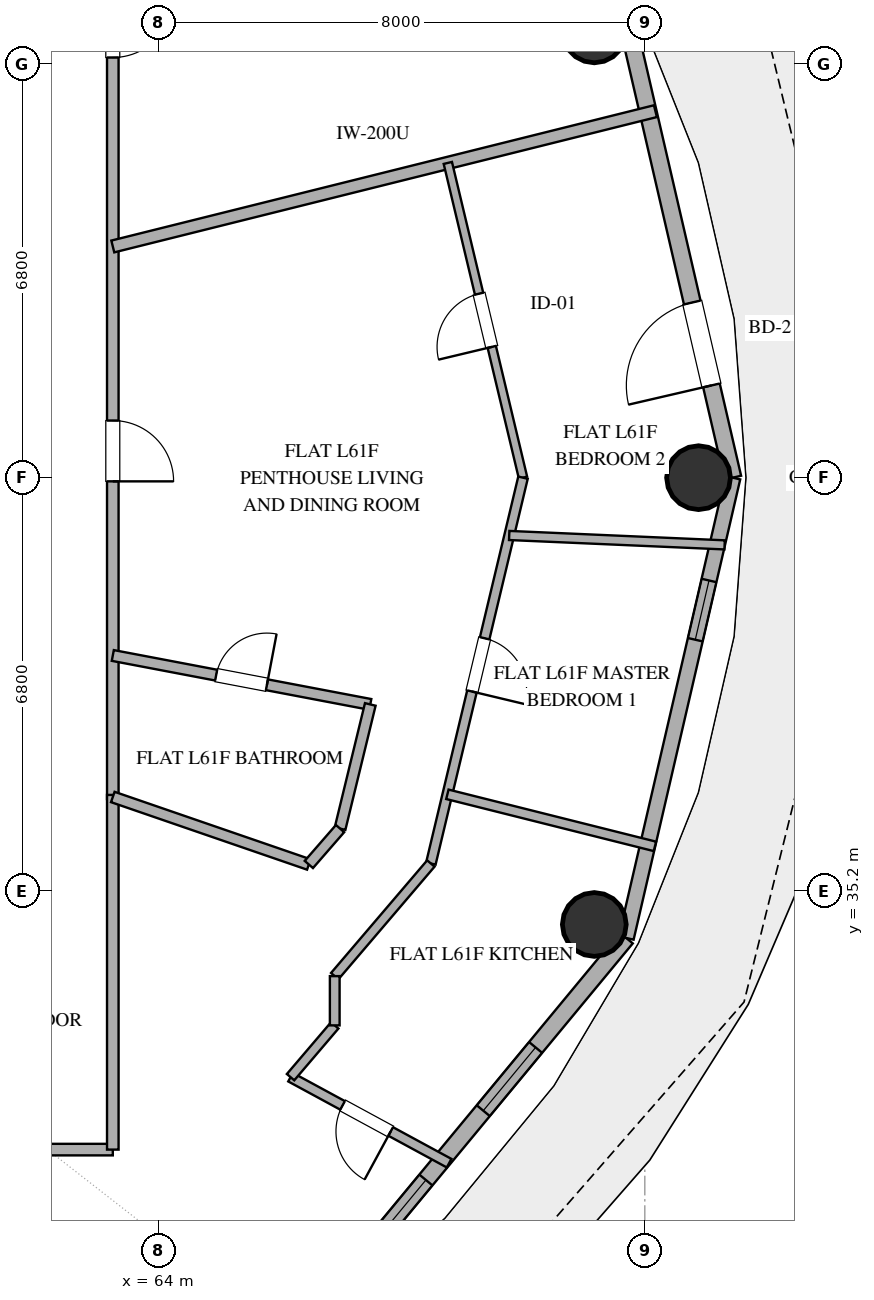
"""IFC4 building model, lengths in metres.
Left out: names, types, materials, properties, quantities, classifications, styles, units other than length and angle.
Written with IfcOpenShell. Run it as: python <this file> out.ifc"""

import sys

from ifc_helpers import new_model, si_unit, direction, frame, frame_2d, origin, origin_2d, place, context, subcontext, project, spatial, rectangle, hollow_circle, extrude, element, fill, save


model = new_model("IFC4")
c1 = context("Model", 3, precision=1e-05, world=origin(), true_north=direction((0.0, 1.0)))
c2 = subcontext(c1, "Body", "Model", "MODEL_VIEW")
j1 = project(units=[si_unit("LENGTHUNIT", "METRE"), si_unit("PLANEANGLEUNIT", "RADIAN")], contexts=[c1])
p1 = place(None, origin())
s1 = spatial("IfcSite", under=j1, at=p1, CompositionType="ELEMENT")
p2 = place(p1, origin())
s2 = spatial("IfcBuilding", under=s1, at=p2, CompositionType="ELEMENT")
p3 = place(p2, frame((0.0, 0.0, 238.8)))
s3 = spatial("IfcBuildingStorey", under=s2, at=p3, CompositionType="ELEMENT", Elevation=238.8)
for number, where, z_axis, x_axis in (
    (1, (72.883, 42.0, 0.0), (0.0, 0.0, 1.0), (1.0, 0.0, 0.0)),
    (2, (71.169, 49.347, 0.0), (0.0, 0.0, 1.0), (1.0, 0.0, 0.0)),
    (3, (71.169, 34.653, 0.0), (0.0, 0.0, 1.0), (1.0, 0.0, 0.0)),
):
    element("IfcColumn", number, at=place(p3, frame(where, z_axis=z_axis, x_axis=x_axis)), inside=s3, PredefinedType="COLUMN", context=c2, shape_type="SweptSolid", body=[
        extrude(hollow_circle(Radius=0.525, WallThickness=0.028, at=origin_2d()), origin(), (0.0, 0.0, 1.0), 3.36),
    ])
p4 = place(p3, frame((73.447, 42.0, 0.0), z_axis=(0.0, 0.0, 1.0), x_axis=(-0.225635078214, 0.974211892495, 0.0)))
e4 = element("IfcWall", 4, at=p4, inside=s3, PredefinedType="SOLIDWALL", context=c2, shape_type="SweptSolid", body=[
    extrude(rectangle(XDim=7.77, YDim=0.28, at=frame_2d((3.885, 0.0))), origin(), (0.0, 0.0, 1.0), 3.36),
])
p5 = place(p4, frame((1.557, 0.0, 0.0)))
e5 = element("IfcOpeningElement", 5, at=p5, cuts=e4, PredefinedType="OPENING", context=c2, shape_type="SweptSolid", body=[
    extrude(rectangle(XDim=1.4, YDim=2.2, at=frame_2d((0.7, 1.1))), frame((0.0, 0.15, 0.0), z_axis=(0.0, -1.0, 0.0), x_axis=(1.0, 0.0, 0.0)), (0.0, 0.0, 1.0), 0.3),
])
p6 = place(p3, frame((66.383, 28.013, 0.0), z_axis=(0.0, 0.0, 1.0), x_axis=(0.63761509934, 0.770355103243, 0.0)))
e6 = element("IfcWall", 6, at=p6, inside=s3, PredefinedType="SOLIDWALL", context=c2, shape_type="SweptSolid", body=[
    extrude(rectangle(XDim=8.33, YDim=0.28, at=frame_2d((4.165, 0.0))), origin(), (0.0, 0.0, 1.0), 3.36),
])
p7 = place(p6, frame((1.663, 0.0, 0.85)))
e7 = element("IfcOpeningElement", 7, at=p7, cuts=e6, PredefinedType="OPENING", context=c2, shape_type="SweptSolid", body=[
    extrude(rectangle(XDim=1.5, YDim=1.8, at=frame_2d((0.75, 0.9))), frame((0.0, 0.15, 0.0), z_axis=(0.0, -1.0, 0.0), x_axis=(1.0, 0.0, 0.0)), (0.0, 0.0, 1.0), 0.3),
])
p8 = place(p6, frame((4.643, 0.0, 0.85)))
e8 = element("IfcOpeningElement", 8, at=p8, cuts=e6, PredefinedType="OPENING", context=c2, shape_type="SweptSolid", body=[
    extrude(rectangle(XDim=1.35, YDim=1.8, at=frame_2d((0.675, 0.9))), frame((0.0, 0.15, 0.0), z_axis=(0.0, -1.0, 0.0), x_axis=(1.0, 0.0, 0.0)), (0.0, 0.0, 1.0), 0.3),
])
p9 = place(p3, frame((71.694, 34.43, 0.0), z_axis=(0.0, 0.0, 1.0), x_axis=(0.225635078214, 0.974211892495, 0.0)))
e9 = element("IfcWall", 9, at=p9, inside=s3, PredefinedType="SOLIDWALL", context=c2, shape_type="SweptSolid", body=[
    extrude(rectangle(XDim=7.77, YDim=0.25, at=frame_2d((3.885, 0.0))), origin(), (0.0, 0.0, 1.0), 3.36),
])
p10 = place(p9, frame((5.034, 0.0, 1.42)))
e10 = element("IfcOpeningElement", 10, at=p10, cuts=e9, PredefinedType="OPENING", context=c2, shape_type="SweptSolid", body=[
    extrude(rectangle(XDim=1.0, YDim=1.05, at=frame_2d((0.5, 0.525))), frame((0.0, 0.135, 0.0), z_axis=(0.0, -1.0, 0.0), x_axis=(1.0, 0.0, 0.0)), (0.0, 0.0, 1.0), 0.27),
])
p11 = place(p3, frame((63.25, 30.95, 0.0), z_axis=(0.0, 0.0, 1.0), x_axis=(-1.0, 0.0, 0.0)))
e11 = element("IfcWall", 11, at=p11, inside=s3, PredefinedType="PARTITIONING", context=c2, shape_type="SweptSolid", body=[
    extrude(rectangle(XDim=19.715, YDim=0.19, at=frame_2d((9.857, 0.0))), origin(), (0.0, 0.0, 1.0), 2.72),
])
p12 = place(p11, frame((11.632, 0.0, 0.0)))
e12 = element("IfcOpeningElement", 12, at=p12, cuts=e11, PredefinedType="OPENING", context=c2, shape_type="SweptSolid", body=[
    extrude(rectangle(XDim=1.0, YDim=2.2, at=frame_2d((0.5, 1.1))), frame((0.0, 0.105, 0.0), z_axis=(0.0, -1.0, 0.0), x_axis=(1.0, 0.0, 0.0)), (0.0, 0.0, 1.0), 0.21),
])
p13 = place(p3, frame((63.25, 53.05, 0.0), z_axis=(0.0, 0.0, 1.0), x_axis=(0.0, -1.0, 0.0)))
e13 = element("IfcWall", 13, at=p13, inside=s3, PredefinedType="PARTITIONING", context=c2, shape_type="SweptSolid", body=[
    extrude(rectangle(XDim=16.335, YDim=0.19, at=frame_2d((8.167, 0.0))), origin(), (0.0, 0.0, 1.0), 2.72),
])
p14 = place(p13, frame((3.14, 0.0, 0.0)))
e14 = element("IfcOpeningElement", 14, at=p14, cuts=e13, PredefinedType="OPENING", context=c2, shape_type="SweptSolid", body=[
    extrude(rectangle(XDim=1.0, YDim=2.2, at=frame_2d((0.5, 1.1))), frame((0.0, 0.105, 0.0), z_axis=(0.0, -1.0, 0.0), x_axis=(1.0, 0.0, 0.0)), (0.0, 0.0, 1.0), 0.21),
])
p15 = place(p13, frame((10.111, 0.0, 0.0)))
e15 = element("IfcOpeningElement", 15, at=p15, cuts=e13, PredefinedType="OPENING", context=c2, shape_type="SweptSolid", body=[
    extrude(rectangle(XDim=1.0, YDim=2.2, at=frame_2d((0.5, 1.1))), frame((0.0, 0.105, 0.0), z_axis=(0.0, -1.0, 0.0), x_axis=(1.0, 0.0, 0.0)), (0.0, 0.0, 1.0), 0.21),
])
p16 = place(p3, frame((63.25, 36.783, 0.0), z_axis=(0.0, 0.0, 1.0), x_axis=(0.0, -1.0, 0.0)))
e16 = element("IfcWall", 16, at=p16, inside=s3, PredefinedType="PARTITIONING", context=c2, shape_type="SweptSolid", body=[
    extrude(rectangle(XDim=5.833, YDim=0.19, at=frame_2d((2.917, 0.0))), origin(), (0.0, 0.0, 1.0), 2.72),
])
p17 = place(p3, frame((63.25, 45.802, 0.0), z_axis=(0.0, 0.0, 1.0), x_axis=(0.970293772743, 0.241929730659, 0.0)))
e17 = element("IfcWall", 17, at=p17, inside=s3, PredefinedType="PARTITIONING", context=c2, shape_type="SweptSolid", body=[
    extrude(rectangle(XDim=9.197, YDim=0.2, at=frame_2d((4.599, 0.0))), origin(), (0.0, 0.0, 1.0), 2.72),
])
p18 = place(p3, frame((69.996, 42.0, 0.0), z_axis=(0.0, 0.0, 1.0), x_axis=(-0.232321322639, 0.972639091877, 0.0)))
e18 = element("IfcWall", 18, at=p18, inside=s3, PredefinedType="PARTITIONING", context=c2, shape_type="SweptSolid", body=[
    extrude(rectangle(XDim=5.322, YDim=0.14, at=frame_2d((2.661, 0.0))), origin(), (0.0, 0.0, 1.0), 2.72),
])
p19 = place(p18, frame((2.211, 0.0, 0.0)))
e19 = element("IfcOpeningElement", 19, at=p19, cuts=e18, PredefinedType="OPENING", context=c2, shape_type="SweptSolid", body=[
    extrude(rectangle(XDim=0.9, YDim=2.1, at=frame_2d((0.45, 1.05))), frame((0.0, 0.08, 0.0), z_axis=(0.0, -1.0, 0.0), x_axis=(1.0, 0.0, 0.0)), (0.0, 0.0, 1.0), 0.16),
])
p20 = place(p3, frame((69.996, 42.0, 0.0), z_axis=(0.0, 0.0, 1.0), x_axis=(-0.232298462197, -0.972644551962, 0.0)))
e20 = element("IfcWall", 20, at=p20, inside=s3, PredefinedType="PLUMBINGWALL", context=c2, shape_type="SweptSolid", body=[
    extrude(rectangle(XDim=6.523, YDim=0.16, at=frame_2d((3.262, 0.0))), origin(), (0.0, 0.0, 1.0), 2.72),
])
p21 = place(p20, frame((2.715, 0.0, 0.0)))
e21 = element("IfcOpeningElement", 21, at=p21, cuts=e20, PredefinedType="OPENING", context=c2, shape_type="SweptSolid", body=[
    extrude(rectangle(XDim=0.9, YDim=2.1, at=frame_2d((0.45, 1.05))), frame((0.0, 0.09, 0.0), z_axis=(0.0, -1.0, 0.0), x_axis=(1.0, 0.0, 0.0)), (0.0, 0.0, 1.0), 0.18),
])
p22 = place(p3, frame((63.25, 39.076, 0.0), z_axis=(0.0, 0.0, 1.0), x_axis=(0.982398995864, -0.186794574134, 0.0)))
e22 = element("IfcWall", 22, at=p22, inside=s3, PredefinedType="PLUMBINGWALL", context=c2, shape_type="SweptSolid", body=[
    extrude(rectangle(XDim=4.311, YDim=0.18, at=frame_2d((2.155, 0.0))), origin(), (0.0, 0.0, 1.0), 2.72),
])
p23 = place(p22, frame((1.73, 0.0, 0.0)))
e23 = element("IfcOpeningElement", 23, at=p23, cuts=e22, PredefinedType="OPENING", context=c2, shape_type="SweptSolid", body=[
    extrude(rectangle(XDim=0.85, YDim=2.1, at=frame_2d((0.425, 1.05))), frame((0.0, 0.1, 0.0), z_axis=(0.0, -1.0, 0.0), x_axis=(1.0, 0.0, 0.0)), (0.0, 0.0, 1.0), 0.2),
])
p24 = place(p3, frame((73.312, 40.895, 0.0), z_axis=(0.0, 0.0, 1.0), x_axis=(-0.999049912793, 0.043580635022, 0.0)))
e24 = element("IfcWall", 24, at=p24, inside=s3, PredefinedType="PARTITIONING", context=c2, shape_type="SweptSolid", body=[
    extrude(rectangle(XDim=3.546, YDim=0.15, at=frame_2d((1.773, 0.0))), origin(), (0.0, 0.0, 1.0), 2.72),
])
p25 = place(p3, frame((72.166, 35.937, 0.0), z_axis=(0.0, 0.0, 1.0), x_axis=(-0.96994628441, 0.24331914302, 0.0)))
e25 = element("IfcWall", 25, at=p25, inside=s3, PredefinedType="PLUMBINGWALL", context=c2, shape_type="SweptSolid", body=[
    extrude(rectangle(XDim=3.519, YDim=0.16, at=frame_2d((1.759, 0.0))), origin(), (0.0, 0.0, 1.0), 2.72),
])
p26 = place(p3, frame((66.474, 35.639, 0.0), z_axis=(0.0, 0.0, 1.0), x_axis=(-0.945522773294, 0.325555963211, 0.0)))
e26 = element("IfcWall", 26, at=p26, inside=s3, PredefinedType="PLUMBINGWALL", context=c2, shape_type="SweptSolid", body=[
    extrude(rectangle(XDim=3.41, YDim=0.18, at=frame_2d((1.705, 0.0))), origin(), (0.0, 0.0, 1.0), 2.72),
])
p27 = place(p3, frame((68.781, 30.727, 0.0), z_axis=(0.0, 0.0, 1.0), x_axis=(-0.878981574643, 0.476855734408, 0.0)))
e27 = element("IfcWall", 27, at=p27, inside=s3, PredefinedType="PLUMBINGWALL", context=c2, shape_type="SweptSolid", body=[
    extrude(rectangle(XDim=2.966, YDim=0.16, at=frame_2d((1.483, 0.0))), origin(), (0.0, 0.0, 1.0), 2.72),
])
p28 = place(p27, frame((1.093, 0.0, 0.0)))
e28 = element("IfcOpeningElement", 28, at=p28, cuts=e27, PredefinedType="OPENING", context=c2, shape_type="SweptSolid", body=[
    extrude(rectangle(XDim=0.9, YDim=2.1, at=frame_2d((0.45, 1.05))), frame((0.0, 0.09, 0.0), z_axis=(0.0, -1.0, 0.0), x_axis=(1.0, 0.0, 0.0)), (0.0, 0.0, 1.0), 0.18),
])
p29 = place(p3, frame((66.9, 33.803, 0.0), z_axis=(0.0, 0.0, 1.0), x_axis=(0.649270866973, 0.760557257082, 0.0)))
e29 = element("IfcWall", 29, at=p29, inside=s3, PredefinedType="PLUMBINGWALL", context=c2, shape_type="SweptSolid", body=[
    extrude(rectangle(XDim=2.435, YDim=0.16, at=frame_2d((1.218, 0.0))), origin(), (0.0, 0.0, 1.0), 2.72),
])
p30 = place(p3, frame((67.485, 38.271, 0.0), z_axis=(0.0, 0.0, 1.0), x_axis=(-0.236517575433, -0.971627210668, 0.0)))
e30 = element("IfcWall", 30, at=p30, inside=s3, PredefinedType="PLUMBINGWALL", context=c2, shape_type="SweptSolid", body=[
    extrude(rectangle(XDim=2.102, YDim=0.18, at=frame_2d((1.051, 0.0))), origin(), (0.0, 0.0, 1.0), 2.72),
])
p31 = place(p3, frame((66.174, 32.141, 0.0), z_axis=(0.0, 0.0, 1.0), x_axis=(0.648939178463, 0.760840287219, 0.0)))
e31 = element("IfcWall", 31, at=p31, inside=s3, PredefinedType="PLUMBINGWALL", context=c2, shape_type="SweptSolid", body=[
    extrude(rectangle(XDim=1.119, YDim=0.16, at=frame_2d((0.56, 0.0))), origin(), (0.0, 0.0, 1.0), 2.72),
])
p32 = place(p3, frame((66.9, 32.993, 0.0), z_axis=(0.0, 0.0, 1.0), x_axis=(0.0, 1.0, 0.0)))
e32 = element("IfcWall", 32, at=p32, inside=s3, PredefinedType="PLUMBINGWALL", context=c2, shape_type="SweptSolid", body=[
    extrude(rectangle(XDim=0.81, YDim=0.16, at=frame_2d((0.405, 0.0))), origin(), (0.0, 0.0, 1.0), 2.72),
])
p33 = place(p3, frame((66.988, 36.229, 0.0), z_axis=(0.0, 0.0, 1.0), x_axis=(-0.656402785683, -0.754410619589, 0.0)))
e33 = element("IfcWall", 33, at=p33, inside=s3, PredefinedType="PLUMBINGWALL", context=c2, shape_type="SweptSolid", body=[
    extrude(rectangle(XDim=0.782, YDim=0.18, at=frame_2d((0.391, 0.0))), origin(), (0.0, 0.0, 1.0), 2.72),
])
p34 = place(p5, origin())
e34 = element("IfcDoor", 34, at=p34, inside=s3, OperationType="SINGLE_SWING_LEFT", PredefinedType="DOOR", context=c2, shape_type="SweptSolid", body=[
    extrude(rectangle(XDim=1.4, YDim=2.2, at=frame_2d((0.7, 1.1))), frame((0.0, 0.025, 0.0), z_axis=(0.0, -1.0, 0.0), x_axis=(1.0, 0.0, 0.0)), (0.0, 0.0, 1.0), 0.05),
])
fill(e5, e34)
p35 = place(p7, origin())
e35 = element("IfcWindow", 35, at=p35, inside=s3, PartitioningType="SINGLE_PANEL", PredefinedType="WINDOW", context=c2, shape_type="SweptSolid", body=[
    extrude(rectangle(XDim=1.5, YDim=1.8, at=frame_2d((0.75, 0.9))), frame((0.0, 0.03, 0.0), z_axis=(0.0, -1.0, 0.0), x_axis=(1.0, 0.0, 0.0)), (0.0, 0.0, 1.0), 0.06),
])
fill(e7, e35)
p36 = place(p8, origin())
e36 = element("IfcWindow", 36, at=p36, inside=s3, PartitioningType="SINGLE_PANEL", PredefinedType="WINDOW", context=c2, shape_type="SweptSolid", body=[
    extrude(rectangle(XDim=1.35, YDim=1.8, at=frame_2d((0.675, 0.9))), frame((0.0, 0.03, 0.0), z_axis=(0.0, -1.0, 0.0), x_axis=(1.0, 0.0, 0.0)), (0.0, 0.0, 1.0), 0.06),
])
fill(e8, e36)
p37 = place(p10, origin())
e37 = element("IfcWindow", 37, at=p37, inside=s3, PartitioningType="SINGLE_PANEL", PredefinedType="WINDOW", context=c2, shape_type="SweptSolid", body=[
    extrude(rectangle(XDim=1.0, YDim=1.05, at=frame_2d((0.5, 0.525))), frame((0.0, 0.03, 0.0), z_axis=(0.0, -1.0, 0.0), x_axis=(1.0, 0.0, 0.0)), (0.0, 0.0, 1.0), 0.06),
])
fill(e10, e37)
p38 = place(p14, origin())
e38 = element("IfcDoor", 38, at=p38, inside=s3, OperationType="SINGLE_SWING_LEFT", PredefinedType="DOOR", context=c2, shape_type="SweptSolid", body=[
    extrude(rectangle(XDim=1.0, YDim=2.2, at=frame_2d((0.5, 1.1))), frame((0.0, 0.025, 0.0), z_axis=(0.0, -1.0, 0.0), x_axis=(1.0, 0.0, 0.0)), (0.0, 0.0, 1.0), 0.05),
])
fill(e14, e38)
p39 = place(p15, origin())
e39 = element("IfcDoor", 39, at=p39, inside=s3, OperationType="SINGLE_SWING_RIGHT", PredefinedType="DOOR", context=c2, shape_type="SweptSolid", body=[
    extrude(rectangle(XDim=1.0, YDim=2.2, at=frame_2d((0.5, 1.1))), frame((0.0, 0.025, 0.0), z_axis=(0.0, -1.0, 0.0), x_axis=(1.0, 0.0, 0.0)), (0.0, 0.0, 1.0), 0.05),
])
fill(e15, e39)
p40 = place(p19, origin())
e40 = element("IfcDoor", 40, at=p40, inside=s3, OperationType="SINGLE_SWING_LEFT", PredefinedType="DOOR", context=c2, shape_type="SweptSolid", body=[
    extrude(rectangle(XDim=0.9, YDim=2.1, at=frame_2d((0.45, 1.05))), frame((0.0, 0.025, 0.0), z_axis=(0.0, -1.0, 0.0), x_axis=(1.0, 0.0, 0.0)), (0.0, 0.0, 1.0), 0.05),
])
fill(e19, e40)
p41 = place(p21, origin())
e41 = element("IfcDoor", 41, at=p41, inside=s3, OperationType="SINGLE_SWING_RIGHT", PredefinedType="DOOR", context=c2, shape_type="SweptSolid", body=[
    extrude(rectangle(XDim=0.9, YDim=2.1, at=frame_2d((0.45, 1.05))), frame((0.0, 0.025, 0.0), z_axis=(0.0, -1.0, 0.0), x_axis=(1.0, 0.0, 0.0)), (0.0, 0.0, 1.0), 0.05),
])
fill(e21, e41)
p42 = place(p23, origin())
e42 = element("IfcDoor", 42, at=p42, inside=s3, OperationType="SINGLE_SWING_RIGHT", PredefinedType="DOOR", context=c2, shape_type="SweptSolid", body=[
    extrude(rectangle(XDim=0.85, YDim=2.1, at=frame_2d((0.425, 1.05))), frame((0.0, 0.025, 0.0), z_axis=(0.0, -1.0, 0.0), x_axis=(1.0, 0.0, 0.0)), (0.0, 0.0, 1.0), 0.05),
])
fill(e23, e42)
p43 = place(p28, origin())
e43 = element("IfcDoor", 43, at=p43, inside=s3, OperationType="SINGLE_SWING_LEFT", PredefinedType="DOOR", context=c2, shape_type="SweptSolid", body=[
    extrude(rectangle(XDim=0.9, YDim=2.1, at=frame_2d((0.45, 1.05))), frame((0.0, 0.025, 0.0), z_axis=(0.0, -1.0, 0.0), x_axis=(1.0, 0.0, 0.0)), (0.0, 0.0, 1.0), 0.05),
])
fill(e28, e43)
save(model, sys.argv[1])
